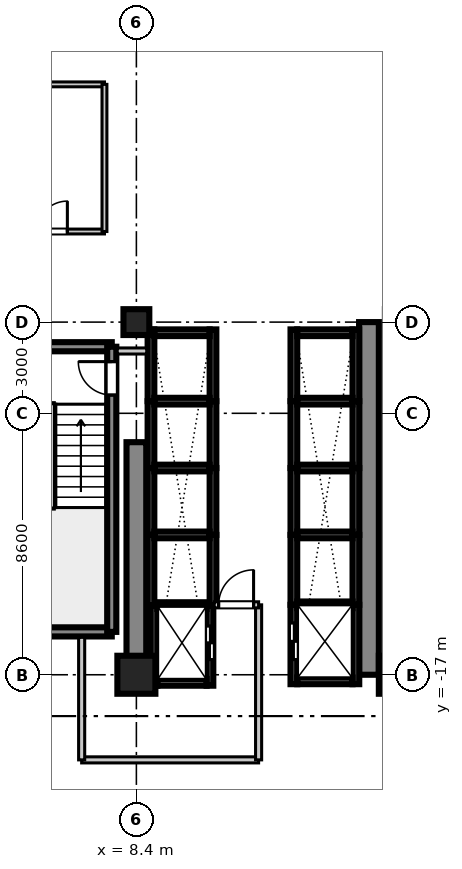
"""IFC4 building model, lengths in metres.
Left out: names, types, materials, properties, quantities, classifications, styles, units other than length and angle.
Written with IfcOpenShell. Run it as: python <this file> out.ifc"""

import sys

from ifc_helpers import new_model, si_unit, direction, frame, frame_2d, origin, origin_2d, place, context, subcontext, project, spatial, rectangle, extrude, source, transform, mapped, element, fill, save


model = new_model("IFC4")
c1 = context("Model", 3, precision=1e-05, world=origin(), true_north=direction((0.0, 1.0)))
c2 = subcontext(c1, "Body", "Model", "MODEL_VIEW")
j1 = project(units=[si_unit("LENGTHUNIT", "METRE"), si_unit("PLANEANGLEUNIT", "RADIAN")], contexts=[c1])
p1 = place(None, origin())
s1 = spatial("IfcSite", under=j1, at=p1, CompositionType="ELEMENT")
p2 = place(p1, origin())
s2 = spatial("IfcBuilding", under=s1, at=p2, CompositionType="ELEMENT")
p3 = place(p2, frame((0.0, 0.0, 110.2)))
s3 = spatial("IfcBuildingStorey", under=s2, at=p3, CompositionType="ELEMENT", Elevation=110.2)
m1 = source(origin(), c2, "Body", "SweptSolid", [
    extrude(rectangle(XDim=1.25, YDim=1.25, at=origin_2d()), origin(), (0.0, 0.0, 1.0), 3.605),
])
p4 = place(p3, frame((8.4, -17.0, 0.0), z_axis=(0.0, 0.0, 1.0), x_axis=(1.0, 0.0, 0.0)))
e1 = element("IfcColumn", 1, at=p4, inside=s3, PredefinedType="COLUMN", context=c2, shape_type="MappedRepresentation", body=[
    mapped(m1, transform((0.0, 0.0, 0.0), scale=1.0)),
])
m2 = source(origin(), c2, "Body", "SweptSolid", [
    extrude(rectangle(XDim=0.85, YDim=0.85, at=origin_2d()), origin(), (0.0, 0.0, 1.0), 3.605),
])
p5 = place(p3, frame((8.4, -5.4, 0.0), z_axis=(0.0, 0.0, 1.0), x_axis=(1.0, 0.0, 0.0)))
e2 = element("IfcColumn", 2, at=p5, inside=s3, PredefinedType="PILASTER", context=c2, shape_type="MappedRepresentation", body=[
    mapped(m2, transform((0.0, 0.0, 0.0), scale=1.0)),
])
p6 = place(p3, frame((17.0, -17.0, 0.0), z_axis=(0.0, 0.0, 1.0), x_axis=(1.0, 0.0, 0.0)))
e3 = element("IfcColumn", 3, at=p6, inside=s3, PredefinedType="COLUMN", context=c2, shape_type="MappedRepresentation", body=[
    mapped(m1, transform((0.0, 0.0, 0.0), scale=1.0)),
])
m3 = source(origin(), c2, "Body", "SweptSolid", [
    extrude(rectangle(XDim=7.65, YDim=0.65, at=frame_2d((3.825, 0.0))), origin(), (0.0, 0.0, 1.0), 3.38),
])
p7 = place(p3, frame((8.4, -17.0, 0.0), z_axis=(0.0, 0.0, 1.0), x_axis=(0.0, 1.0, 0.0)))
e4 = element("IfcWall", 4, at=p7, inside=s3, PredefinedType="SHEAR", context=c2, shape_type="MappedRepresentation", body=[
    mapped(m3, transform((0.0, 0.0, 0.0), scale=1.0)),
])
m4 = source(origin(), c2, "Body", "SweptSolid", [
    extrude(rectangle(XDim=11.6, YDim=0.65, at=frame_2d((5.8, 0.0))), origin(), (0.0, 0.0, 1.0), 3.38),
])
p8 = place(p3, frame((16.05, -17.0, 0.0), z_axis=(0.0, 0.0, 1.0), x_axis=(0.0, 1.0, 0.0)))
e5 = element("IfcWall", 5, at=p8, inside=s3, PredefinedType="SHEAR", context=c2, shape_type="MappedRepresentation", body=[
    mapped(m4, transform((0.0, 0.0, 0.0), scale=1.0)),
])
m5 = source(origin(), c2, "Body", "SweptSolid", [
    extrude(rectangle(XDim=3.98, YDim=0.3, at=frame_2d((1.99, 0.0))), origin(), (0.0, 0.0, 1.0), 3.38),
])
for number, where, z_axis, x_axis in (
    (6, (3.61, -15.59, 0.0), (0.0, 0.0, 1.0), (1.0, 0.0, 0.0)),
    (7, (3.61, -6.21, 0.0), (0.0, 0.0, 1.0), (1.0, 0.0, 0.0)),
):
    element("IfcWall", number, at=place(p3, frame(where, z_axis=z_axis, x_axis=x_axis)), inside=s3, PredefinedType="SHEAR", context=c2, shape_type="MappedRepresentation", body=[
        mapped(m5, transform((0.0, 0.0, 0.0), scale=1.0)),
    ])
m6 = source(origin(), c2, "Body", "SweptSolid", [
    extrude(rectangle(XDim=9.38, YDim=0.3, at=frame_2d((4.69, 0.0))), origin(), (0.0, 0.0, 1.0), 3.38),
])
p9 = place(p3, frame((7.59, -15.59, 0.0), z_axis=(0.0, 0.0, 1.0), x_axis=(0.0, 1.0, 0.0)))
e8 = element("IfcWall", 8, at=p9, inside=s3, PredefinedType="SHEAR", context=c2, shape_type="MappedRepresentation", body=[
    mapped(m6, transform((0.0, 0.0, 0.0), scale=1.0)),
])
p10 = place(p9, frame((7.79, 0.0, 0.0)))
e9 = element("IfcOpeningElement", 9, at=p10, cuts=e8, PredefinedType="OPENING", context=c2, shape_type="SweptSolid", body=[
    extrude(rectangle(XDim=1.1, YDim=2.15, at=frame_2d((0.55, 1.075))), frame((0.0, 0.16, 0.0), z_axis=(0.0, -1.0, 0.0), x_axis=(1.0, 0.0, 0.0)), (0.0, 0.0, 1.0), 0.32),
])
m7 = source(origin(), c2, "Body", "SweptSolid", [
    extrude(rectangle(XDim=2.36, YDim=0.22, at=frame_2d((1.18, 0.0))), origin(), (0.0, 0.0, 1.0), 3.38),
])
for number, where, z_axis, x_axis in (
    (10, (13.58, -8.0, 0.0), (0.0, 0.0, 1.0), (0.0, 1.0, 0.0)),
    (11, (15.62, -8.0, 0.0), (0.0, 0.0, 1.0), (0.0, 1.0, 0.0)),
):
    element("IfcWall", number, at=place(p3, frame(where, z_axis=z_axis, x_axis=x_axis)), inside=s3, PredefinedType="SHEAR", context=c2, shape_type="MappedRepresentation", body=[
        mapped(m7, transform((0.0, 0.0, 0.0), scale=1.0)),
    ])
m8 = source(origin(), c2, "Body", "SweptSolid", [
    extrude(rectangle(XDim=1.82, YDim=0.22, at=frame_2d((0.91, 0.0))), origin(), (0.0, 0.0, 1.0), 3.38),
])
p11 = place(p3, frame((13.69, -5.75, 0.0), z_axis=(0.0, 0.0, 1.0), x_axis=(1.0, 0.0, 0.0)))
e12 = element("IfcWall", 12, at=p11, inside=s3, PredefinedType="SHEAR", context=c2, shape_type="MappedRepresentation", body=[
    mapped(m8, transform((0.0, 0.0, 0.0), scale=1.0)),
])
m9 = source(origin(), c2, "Body", "SweptSolid", [
    extrude(rectangle(XDim=2.2, YDim=0.22, at=frame_2d((1.1, 0.0))), origin(), (0.0, 0.0, 1.0), 3.38),
])
for number, where, z_axis, x_axis in (
    (13, (13.58, -10.2, 0.0), (0.0, 0.0, 1.0), (0.0, 1.0, 0.0)),
    (14, (15.62, -10.2, 0.0), (0.0, 0.0, 1.0), (0.0, 1.0, 0.0)),
):
    element("IfcWall", number, at=place(p3, frame(where, z_axis=z_axis, x_axis=x_axis)), inside=s3, PredefinedType="SHEAR", context=c2, shape_type="MappedRepresentation", body=[
        mapped(m9, transform((0.0, 0.0, 0.0), scale=1.0)),
    ])
m10 = source(origin(), c2, "Body", "SweptSolid", [
    extrude(rectangle(XDim=1.82, YDim=0.22, at=frame_2d((0.91, 0.0))), origin(), (0.0, 0.0, 1.0), 3.65),
])
p12 = place(p3, frame((13.69, -8.0, 0.0), z_axis=(0.0, 0.0, 1.0), x_axis=(1.0, 0.0, 0.0)))
e15 = element("IfcWall", 15, at=p12, inside=s3, PredefinedType="SHEAR", context=c2, shape_type="MappedRepresentation", body=[
    mapped(m10, transform((0.0, 0.0, 0.0), scale=1.0)),
])
for number, where, z_axis, x_axis in (
    (16, (13.58, -12.4, 0.0), (0.0, 0.0, 1.0), (0.0, 1.0, 0.0)),
    (17, (15.62, -12.4, 0.0), (0.0, 0.0, 1.0), (0.0, 1.0, 0.0)),
):
    element("IfcWall", number, at=place(p3, frame(where, z_axis=z_axis, x_axis=x_axis)), inside=s3, PredefinedType="SHEAR", context=c2, shape_type="MappedRepresentation", body=[
        mapped(m9, transform((0.0, 0.0, 0.0), scale=1.0)),
    ])
p13 = place(p3, frame((13.69, -10.2, 0.0), z_axis=(0.0, 0.0, 1.0), x_axis=(1.0, 0.0, 0.0)))
e18 = element("IfcWall", 18, at=p13, inside=s3, PredefinedType="SHEAR", context=c2, shape_type="MappedRepresentation", body=[
    mapped(m10, transform((0.0, 0.0, 0.0), scale=1.0)),
])
m11 = source(origin(), c2, "Body", "SweptSolid", [
    extrude(rectangle(XDim=2.3, YDim=0.22, at=frame_2d((1.15, 0.0))), origin(), (0.0, 0.0, 1.0), 3.38),
])
for number, where, z_axis, x_axis in (
    (19, (13.58, -14.7, 0.0), (0.0, 0.0, 1.0), (0.0, 1.0, 0.0)),
    (20, (15.62, -14.7, 0.0), (0.0, 0.0, 1.0), (0.0, 1.0, 0.0)),
):
    element("IfcWall", number, at=place(p3, frame(where, z_axis=z_axis, x_axis=x_axis)), inside=s3, PredefinedType="SHEAR", context=c2, shape_type="MappedRepresentation", body=[
        mapped(m11, transform((0.0, 0.0, 0.0), scale=1.0)),
    ])
p14 = place(p3, frame((13.69, -12.4, 0.0), z_axis=(0.0, 0.0, 1.0), x_axis=(1.0, 0.0, 0.0)))
e21 = element("IfcWall", 21, at=p14, inside=s3, PredefinedType="SHEAR", context=c2, shape_type="MappedRepresentation", body=[
    mapped(m10, transform((0.0, 0.0, 0.0), scale=1.0)),
])
for number, where, z_axis, x_axis in (
    (22, (8.88, -8.0, 0.0), (0.0, 0.0, 1.0), (0.0, 1.0, 0.0)),
    (23, (10.92, -8.0, 0.0), (0.0, 0.0, 1.0), (0.0, 1.0, 0.0)),
):
    element("IfcWall", number, at=place(p3, frame(where, z_axis=z_axis, x_axis=x_axis)), inside=s3, PredefinedType="SHEAR", context=c2, shape_type="MappedRepresentation", body=[
        mapped(m7, transform((0.0, 0.0, 0.0), scale=1.0)),
    ])
p15 = place(p3, frame((8.99, -5.75, 0.0), z_axis=(0.0, 0.0, 1.0), x_axis=(1.0, 0.0, 0.0)))
e24 = element("IfcWall", 24, at=p15, inside=s3, PredefinedType="SHEAR", context=c2, shape_type="MappedRepresentation", body=[
    mapped(m8, transform((0.0, 0.0, 0.0), scale=1.0)),
])
for number, where, z_axis, x_axis in (
    (25, (8.88, -10.2, 0.0), (0.0, 0.0, 1.0), (0.0, 1.0, 0.0)),
    (26, (10.92, -10.2, 0.0), (0.0, 0.0, 1.0), (0.0, 1.0, 0.0)),
):
    element("IfcWall", number, at=place(p3, frame(where, z_axis=z_axis, x_axis=x_axis)), inside=s3, PredefinedType="SHEAR", context=c2, shape_type="MappedRepresentation", body=[
        mapped(m9, transform((0.0, 0.0, 0.0), scale=1.0)),
    ])
p16 = place(p3, frame((8.99, -8.0, 0.0), z_axis=(0.0, 0.0, 1.0), x_axis=(1.0, 0.0, 0.0)))
e27 = element("IfcWall", 27, at=p16, inside=s3, PredefinedType="SHEAR", context=c2, shape_type="MappedRepresentation", body=[
    mapped(m10, transform((0.0, 0.0, 0.0), scale=1.0)),
])
for number, where, z_axis, x_axis in (
    (28, (8.88, -12.4, 0.0), (0.0, 0.0, 1.0), (0.0, 1.0, 0.0)),
    (29, (10.92, -12.4, 0.0), (0.0, 0.0, 1.0), (0.0, 1.0, 0.0)),
):
    element("IfcWall", number, at=place(p3, frame(where, z_axis=z_axis, x_axis=x_axis)), inside=s3, PredefinedType="SHEAR", context=c2, shape_type="MappedRepresentation", body=[
        mapped(m9, transform((0.0, 0.0, 0.0), scale=1.0)),
    ])
p17 = place(p3, frame((8.99, -10.2, 0.0), z_axis=(0.0, 0.0, 1.0), x_axis=(1.0, 0.0, 0.0)))
e30 = element("IfcWall", 30, at=p17, inside=s3, PredefinedType="SHEAR", context=c2, shape_type="MappedRepresentation", body=[
    mapped(m10, transform((0.0, 0.0, 0.0), scale=1.0)),
])
m12 = source(origin(), c2, "Body", "SweptSolid", [
    extrude(rectangle(XDim=2.325, YDim=0.22, at=frame_2d((1.163, 0.0))), origin(), (0.0, 0.0, 1.0), 3.38),
])
for number, where, z_axis, x_axis in (
    (31, (8.88, -14.725, 0.0), (0.0, 0.0, 1.0), (0.0, 1.0, 0.0)),
    (32, (10.92, -14.725, 0.0), (0.0, 0.0, 1.0), (0.0, 1.0, 0.0)),
):
    element("IfcWall", number, at=place(p3, frame(where, z_axis=z_axis, x_axis=x_axis)), inside=s3, PredefinedType="SHEAR", context=c2, shape_type="MappedRepresentation", body=[
        mapped(m12, transform((0.0, 0.0, 0.0), scale=1.0)),
    ])
p18 = place(p3, frame((8.99, -12.4, 0.0), z_axis=(0.0, 0.0, 1.0), x_axis=(1.0, 0.0, 0.0)))
e33 = element("IfcWall", 33, at=p18, inside=s3, PredefinedType="SHEAR", context=c2, shape_type="MappedRepresentation", body=[
    mapped(m10, transform((0.0, 0.0, 0.0), scale=1.0)),
])
m13 = source(origin(), c2, "Body", "SweptSolid", [
    extrude(rectangle(XDim=2.635, YDim=0.22, at=frame_2d((1.317, 0.0))), origin(), (0.0, 0.0, 1.0), 3.38),
])
p19 = place(p3, frame((8.98, -17.36, 0.0), z_axis=(0.0, 0.0, 1.0), x_axis=(0.0, 1.0, 0.0)))
e34 = element("IfcWall", 34, at=p19, inside=s3, PredefinedType="SHEAR", context=c2, shape_type="MappedRepresentation", body=[
    mapped(m13, transform((0.0, 0.0, 0.0), scale=1.0)),
])
p20 = place(p3, frame((10.82, -17.36, 0.0), z_axis=(0.0, 0.0, 1.0), x_axis=(0.0, 1.0, 0.0)))
e35 = element("IfcWall", 35, at=p20, inside=s3, PredefinedType="SHEAR", context=c2, shape_type="MappedRepresentation", body=[
    mapped(m13, transform((0.0, 0.0, 0.0), scale=1.0)),
])
p21 = place(p20, frame((0.86, 0.0, 0.0)))
e36 = element("IfcOpeningElement", 36, at=p21, cuts=e35, PredefinedType="OPENING", context=c2, shape_type="SweptSolid", body=[
    extrude(rectangle(XDim=1.1, YDim=2.2, at=frame_2d((0.55, 1.1))), frame((0.0, 0.12, 0.0), z_axis=(0.0, -1.0, 0.0), x_axis=(1.0, 0.0, 0.0)), (0.0, 0.0, 1.0), 0.24),
])
m14 = source(origin(), c2, "Body", "SweptSolid", [
    extrude(rectangle(XDim=1.62, YDim=0.22, at=frame_2d((0.81, 0.0))), origin(), (0.0, 0.0, 1.0), 3.38),
])
p22 = place(p3, frame((9.09, -17.25, 0.0), z_axis=(0.0, 0.0, 1.0), x_axis=(1.0, 0.0, 0.0)))
e37 = element("IfcWall", 37, at=p22, inside=s3, PredefinedType="SHEAR", context=c2, shape_type="MappedRepresentation", body=[
    mapped(m14, transform((0.0, 0.0, 0.0), scale=1.0)),
])
m15 = source(origin(), c2, "Body", "SweptSolid", [
    extrude(rectangle(XDim=1.62, YDim=0.22, at=frame_2d((0.81, 0.0))), origin(), (0.0, 0.0, 1.0), 3.65),
])
p23 = place(p3, frame((9.09, -14.725, 0.0), z_axis=(0.0, 0.0, 1.0), x_axis=(1.0, 0.0, 0.0)))
e38 = element("IfcWall", 38, at=p23, inside=s3, PredefinedType="SHEAR", context=c2, shape_type="MappedRepresentation", body=[
    mapped(m15, transform((0.0, 0.0, 0.0), scale=1.0)),
])
m16 = source(origin(), c2, "Body", "SweptSolid", [
    extrude(rectangle(XDim=2.61, YDim=0.22, at=frame_2d((1.305, 0.0))), origin(), (0.0, 0.0, 1.0), 3.38),
])
p24 = place(p3, frame((13.58, -17.31, 0.0), z_axis=(0.0, 0.0, 1.0), x_axis=(0.0, 1.0, 0.0)))
e39 = element("IfcWall", 39, at=p24, inside=s3, PredefinedType="SHEAR", context=c2, shape_type="MappedRepresentation", body=[
    mapped(m16, transform((0.0, 0.0, 0.0), scale=1.0)),
])
p25 = place(p24, frame((0.81, 0.0, 0.0)))
e40 = element("IfcOpeningElement", 40, at=p25, cuts=e39, PredefinedType="OPENING", context=c2, shape_type="SweptSolid", body=[
    extrude(rectangle(XDim=1.2, YDim=2.2, at=frame_2d((0.6, 1.1))), frame((0.0, 0.12, 0.0), z_axis=(0.0, -1.0, 0.0), x_axis=(1.0, 0.0, 0.0)), (0.0, 0.0, 1.0), 0.24),
])
p26 = place(p3, frame((15.62, -17.31, 0.0), z_axis=(0.0, 0.0, 1.0), x_axis=(0.0, 1.0, 0.0)))
e41 = element("IfcWall", 41, at=p26, inside=s3, PredefinedType="SHEAR", context=c2, shape_type="MappedRepresentation", body=[
    mapped(m16, transform((0.0, 0.0, 0.0), scale=1.0)),
])
p27 = place(p3, frame((13.69, -17.2, 0.0), z_axis=(0.0, 0.0, 1.0), x_axis=(1.0, 0.0, 0.0)))
e42 = element("IfcWall", 42, at=p27, inside=s3, PredefinedType="SHEAR", context=c2, shape_type="MappedRepresentation", body=[
    mapped(m8, transform((0.0, 0.0, 0.0), scale=1.0)),
])
p28 = place(p3, frame((13.69, -14.7, 0.0), z_axis=(0.0, 0.0, 1.0), x_axis=(1.0, 0.0, 0.0)))
e43 = element("IfcWall", 43, at=p28, inside=s3, PredefinedType="SHEAR", context=c2, shape_type="MappedRepresentation", body=[
    mapped(m10, transform((0.0, 0.0, 0.0), scale=1.0)),
])
m17 = source(origin(), c2, "Body", "SweptSolid", [
    extrude(rectangle(XDim=5.82, YDim=0.2, at=frame_2d((2.91, 0.0))), origin(), (0.0, 0.0, 1.0), 2.72),
])
p29 = place(p3, frame((6.6, -19.8, 0.0), z_axis=(0.0, 0.0, 1.0), x_axis=(1.0, 0.0, 0.0)))
e44 = element("IfcWall", 44, at=p29, inside=s3, PredefinedType="PARTITIONING", context=c2, shape_type="MappedRepresentation", body=[
    mapped(m17, transform((0.0, 0.0, 0.0), scale=1.0)),
])
m18 = source(origin(), c2, "Body", "SweptSolid", [
    extrude(rectangle(XDim=4.03, YDim=0.2, at=frame_2d((2.015, 0.0))), origin(), (0.0, 0.0, 1.0), 2.72),
])
p30 = place(p3, frame((6.6, -19.8, 0.0), z_axis=(0.0, 0.0, 1.0), x_axis=(0.0, 1.0, 0.0)))
e45 = element("IfcWall", 45, at=p30, inside=s3, PredefinedType="PARTITIONING", context=c2, shape_type="MappedRepresentation", body=[
    mapped(m18, transform((0.0, 0.0, 0.0), scale=1.0)),
])
m19 = source(origin(), c2, "Body", "SweptSolid", [
    extrude(rectangle(XDim=5.1, YDim=0.2, at=frame_2d((2.55, 0.0))), origin(), (0.0, 0.0, 1.0), 2.72),
])
p31 = place(p3, frame((12.42, -19.8, 0.0), z_axis=(0.0, 0.0, 1.0), x_axis=(0.0, 1.0, 0.0)))
e46 = element("IfcWall", 46, at=p31, inside=s3, PredefinedType="PARTITIONING", context=c2, shape_type="MappedRepresentation", body=[
    mapped(m19, transform((0.0, 0.0, 0.0), scale=1.0)),
])
m20 = source(origin(), c2, "Body", "SweptSolid", [
    extrude(rectangle(XDim=1.46, YDim=0.2, at=frame_2d((0.73, 0.0))), origin(), (0.0, 0.0, 1.0), 2.72),
])
p32 = place(p3, frame((10.96, -14.7, 0.0), z_axis=(0.0, 0.0, 1.0), x_axis=(1.0, 0.0, 0.0)))
e47 = element("IfcWall", 47, at=p32, inside=s3, PredefinedType="PARTITIONING", context=c2, shape_type="MappedRepresentation", body=[
    mapped(m20, transform((0.0, 0.0, 0.0), scale=1.0)),
])
p33 = place(p32, frame((0.145, 0.0, 0.0)))
e48 = element("IfcOpeningElement", 48, at=p33, cuts=e47, PredefinedType="OPENING", context=c2, shape_type="SweptSolid", body=[
    extrude(rectangle(XDim=1.15, YDim=2.15, at=frame_2d((0.575, 1.075))), frame((0.0, 0.11, 0.0), z_axis=(0.0, -1.0, 0.0), x_axis=(1.0, 0.0, 0.0)), (0.0, 0.0, 1.0), 0.22),
])
m21 = source(origin(), c2, "Body", "SweptSolid", [
    extrude(rectangle(XDim=0.97, YDim=0.2, at=frame_2d((0.485, 0.0))), origin(), (0.0, 0.0, 1.0), 2.72),
])
p34 = place(p3, frame((7.77, -6.35, 0.0), z_axis=(0.0, 0.0, 1.0), x_axis=(1.0, 0.0, 0.0)))
e49 = element("IfcWall", 49, at=p34, inside=s3, PredefinedType="PARTITIONING", context=c2, shape_type="MappedRepresentation", body=[
    mapped(m21, transform((0.0, 0.0, 0.0), scale=1.0)),
])
m22 = source(origin(), c2, "Body", "SweptSolid", [
    extrude(rectangle(XDim=3.6, YDim=0.16, at=frame_2d((1.8, 0.0))), origin(), (0.0, 0.0, 1.0), 2.72),
])
p35 = place(p3, frame((3.75, -2.42, 0.0), z_axis=(0.0, 0.0, 1.0), x_axis=(1.0, 0.0, 0.0)))
e50 = element("IfcWall", 50, at=p35, inside=s3, PredefinedType="PARTITIONING", context=c2, shape_type="MappedRepresentation", body=[
    mapped(m22, transform((0.0, 0.0, 0.0), scale=1.0)),
])
p36 = place(p35, frame((1.38, 0.0, 0.0)))
e51 = element("IfcOpeningElement", 51, at=p36, cuts=e50, PredefinedType="OPENING", context=c2, shape_type="SweptSolid", body=[
    extrude(rectangle(XDim=1.0, YDim=2.1, at=frame_2d((0.5, 1.05))), frame((0.0, 0.09, 0.0), z_axis=(0.0, -1.0, 0.0), x_axis=(1.0, 0.0, 0.0)), (0.0, 0.0, 1.0), 0.18),
])
p37 = place(p3, frame((3.75, 2.42, 0.0), z_axis=(0.0, 0.0, 1.0), x_axis=(1.0, 0.0, 0.0)))
e52 = element("IfcWall", 52, at=p37, inside=s3, PredefinedType="PARTITIONING", context=c2, shape_type="MappedRepresentation", body=[
    mapped(m22, transform((0.0, 0.0, 0.0), scale=1.0)),
])
m23 = source(origin(), c2, "Body", "SweptSolid", [
    extrude(rectangle(XDim=4.84, YDim=0.16, at=frame_2d((2.42, 0.0))), origin(), (0.0, 0.0, 1.0), 2.72),
])
p38 = place(p3, frame((7.35, -2.42, 0.0), z_axis=(0.0, 0.0, 1.0), x_axis=(0.0, 1.0, 0.0)))
e53 = element("IfcWall", 53, at=p38, inside=s3, PredefinedType="PARTITIONING", context=c2, shape_type="MappedRepresentation", body=[
    mapped(m23, transform((0.0, 0.0, 0.0), scale=1.0)),
])
m24 = source(origin(), c2, "Body", "SweptSolid", [
    extrude(rectangle(XDim=1.1, YDim=2.15, at=frame_2d((0.55, 1.075))), frame((0.0, 0.025, 0.0), z_axis=(0.0, -1.0, 0.0), x_axis=(1.0, 0.0, 0.0)), (0.0, 0.0, 1.0), 0.05),
])
p39 = place(p10, origin())
e54 = element("IfcDoor", 54, at=p39, inside=s3, OperationType="SINGLE_SWING_RIGHT", PredefinedType="DOOR", context=c2, shape_type="MappedRepresentation", body=[
    mapped(m24, transform((0.0, 0.0, 0.0), scale=1.0)),
])
fill(e9, e54)
m25 = source(origin(), c2, "Body", "SweptSolid", [
    extrude(rectangle(XDim=1.1, YDim=2.2, at=frame_2d((0.55, 1.1))), frame((0.0, 0.025, 0.0), z_axis=(0.0, -1.0, 0.0), x_axis=(1.0, 0.0, 0.0)), (0.0, 0.0, 1.0), 0.05),
])
p40 = place(p21, frame((1.1, 0.0, 0.0), z_axis=(0.0, 0.0, 1.0), x_axis=(-1.0, 0.0, 0.0)))
e55 = element("IfcDoor", 55, at=p40, inside=s3, OperationType="DOUBLE_DOOR_SLIDING", PredefinedType="DOOR", context=c2, shape_type="MappedRepresentation", body=[
    mapped(m25, transform((0.0, 0.0, 0.0), scale=1.0)),
])
fill(e36, e55)
m26 = source(origin(), c2, "Body", "SweptSolid", [
    extrude(rectangle(XDim=1.2, YDim=2.2, at=frame_2d((0.6, 1.1))), frame((0.0, 0.025, 0.0), z_axis=(0.0, -1.0, 0.0), x_axis=(1.0, 0.0, 0.0)), (0.0, 0.0, 1.0), 0.05),
])
p41 = place(p25, origin())
e56 = element("IfcDoor", 56, at=p41, inside=s3, OperationType="DOUBLE_DOOR_SLIDING", PredefinedType="DOOR", context=c2, shape_type="MappedRepresentation", body=[
    mapped(m26, transform((0.0, 0.0, 0.0), scale=1.0)),
])
fill(e40, e56)
m27 = source(origin(), c2, "Body", "SweptSolid", [
    extrude(rectangle(XDim=1.15, YDim=2.15, at=frame_2d((0.575, 1.075))), frame((0.0, 0.025, 0.0), z_axis=(0.0, -1.0, 0.0), x_axis=(1.0, 0.0, 0.0)), (0.0, 0.0, 1.0), 0.05),
])
p42 = place(p33, origin())
e57 = element("IfcDoor", 57, at=p42, inside=s3, OperationType="SINGLE_SWING_RIGHT", PredefinedType="DOOR", context=c2, shape_type="MappedRepresentation", body=[
    mapped(m27, transform((0.0, 0.0, 0.0), scale=1.0)),
])
fill(e48, e57)
m28 = source(origin(), c2, "Body", "SweptSolid", [
    extrude(rectangle(XDim=1.0, YDim=2.1, at=frame_2d((0.5, 1.05))), frame((0.0, 0.025, 0.0), z_axis=(0.0, -1.0, 0.0), x_axis=(1.0, 0.0, 0.0)), (0.0, 0.0, 1.0), 0.05),
])
p43 = place(p36, origin())
e58 = element("IfcDoor", 58, at=p43, inside=s3, OperationType="SINGLE_SWING_RIGHT", PredefinedType="DOOR", context=c2, shape_type="MappedRepresentation", body=[
    mapped(m28, transform((0.0, 0.0, 0.0), scale=1.0)),
])
fill(e51, e58)
save(model, sys.argv[1])
